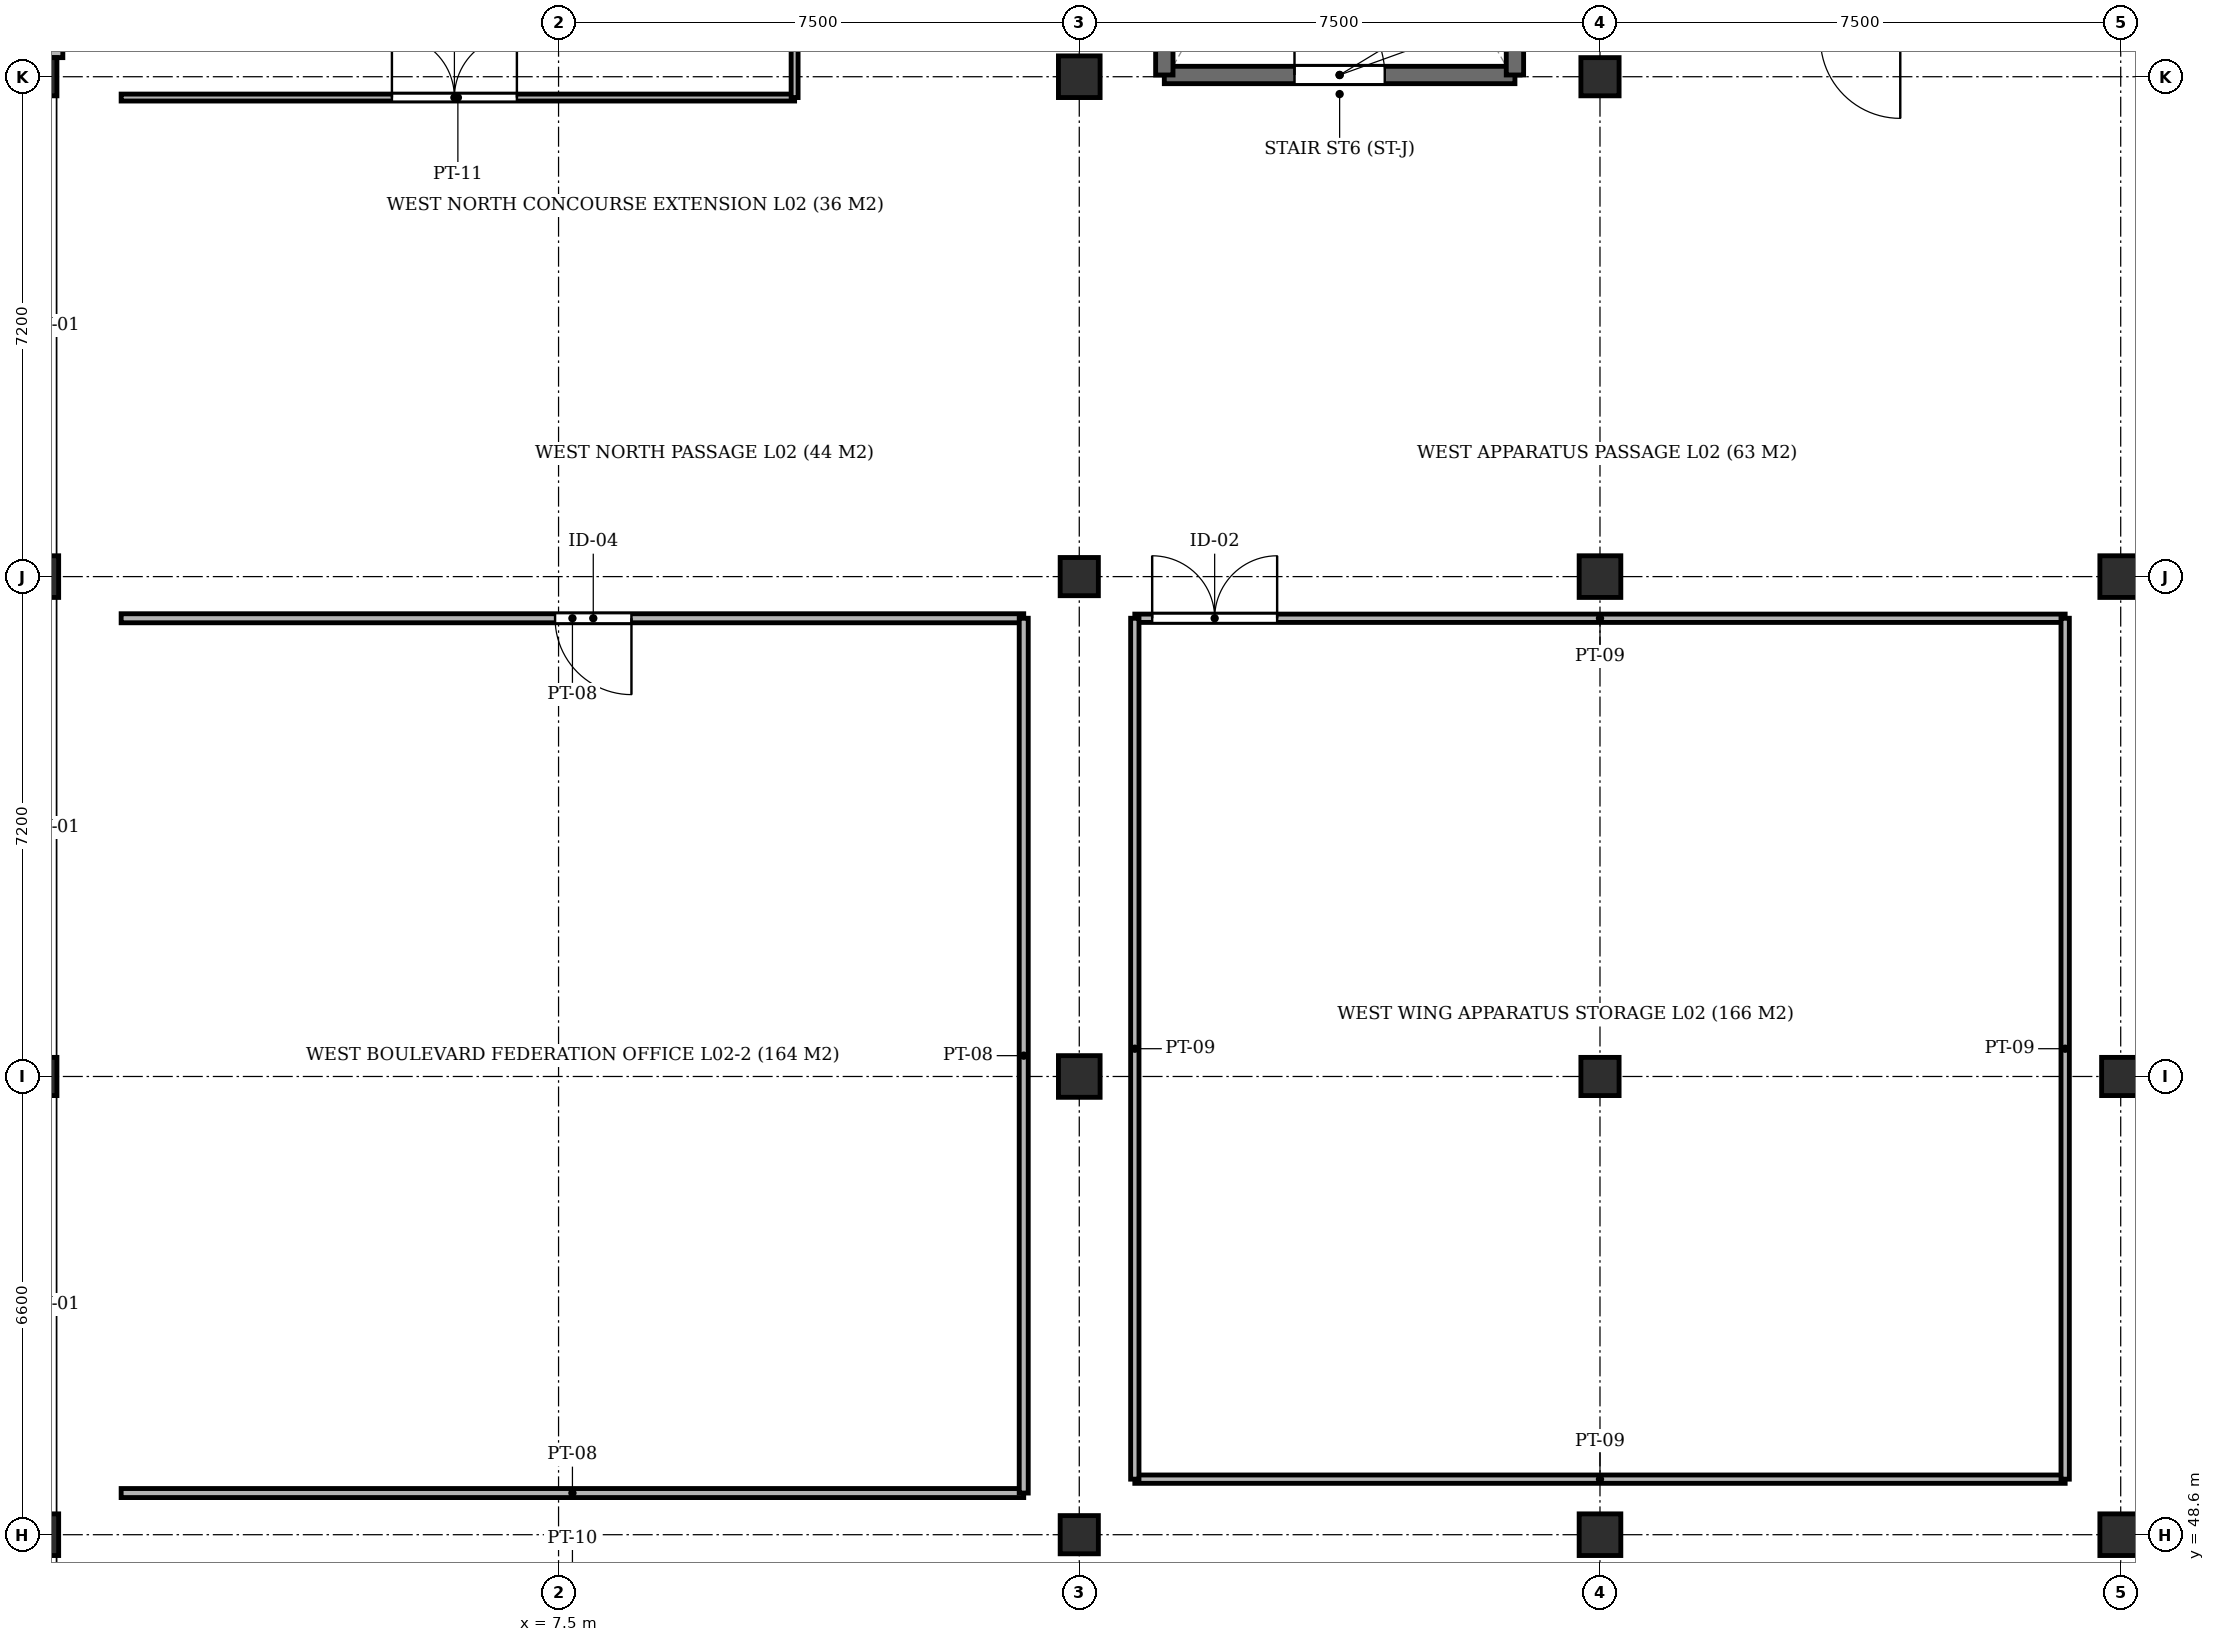
"""IFC4 building model, lengths in metres.
Left out: names, types, materials, properties, quantities, classifications, styles, units other than length and angle.
Written with IfcOpenShell. Run it as: python <this file> out.ifc"""

import sys

from ifc_helpers import new_model, si_unit, direction, frame, frame_2d, origin, origin_2d, place, context, subcontext, project, spatial, rectangle, extrude, element, fill, save


model = new_model("IFC4")
c1 = context("Model", 3, precision=1e-05, world=origin(), true_north=direction((0.0, 1.0)))
c2 = subcontext(c1, "Body", "Model", "MODEL_VIEW")
j1 = project(units=[si_unit("LENGTHUNIT", "METRE"), si_unit("PLANEANGLEUNIT", "RADIAN")], contexts=[c1])
p1 = place(None, origin())
s1 = spatial("IfcSite", under=j1, at=p1, CompositionType="ELEMENT")
p2 = place(p1, origin())
s2 = spatial("IfcBuilding", under=s1, at=p2, CompositionType="ELEMENT")
p3 = place(p2, frame((0.0, 0.0, 9.4)))
s3 = spatial("IfcBuildingStorey", under=s2, at=p3, CompositionType="ELEMENT", Elevation=9.4)
p4 = place(p3, frame((0.0, 48.6, -0.45), z_axis=(0.0, 0.0, 1.0), x_axis=(1.0, 0.0, 0.0)))
e1 = element("IfcColumn", 1, at=p4, inside=s3, PredefinedType="COLUMN", context=c2, shape_type="SweptSolid", body=[
    extrude(rectangle(XDim=0.6, YDim=0.6, at=origin_2d()), origin(), (0.0, 0.0, 1.0), 4.77),
])
p5 = place(p3, frame((0.0, 55.2, -0.45), z_axis=(0.0, 0.0, 1.0), x_axis=(1.0, 0.0, 0.0)))
e2 = element("IfcColumn", 2, at=p5, inside=s3, PredefinedType="COLUMN", context=c2, shape_type="SweptSolid", body=[
    extrude(rectangle(XDim=0.55, YDim=0.55, at=origin_2d()), origin(), (0.0, 0.0, 1.0), 4.77),
])
p6 = place(p3, frame((0.0, 62.4, -0.45), z_axis=(0.0, 0.0, 1.0), x_axis=(1.0, 0.0, 0.0)))
e3 = element("IfcColumn", 3, at=p6, inside=s3, PredefinedType="COLUMN", context=c2, shape_type="SweptSolid", body=[
    extrude(rectangle(XDim=0.6, YDim=0.6, at=origin_2d()), origin(), (0.0, 0.0, 1.0), 4.77),
])
for number, where, z_axis, x_axis in (
    (4, (0.0, 69.6, -0.45), (0.0, 0.0, 1.0), (1.0, 0.0, 0.0)),
    (5, (15.0, 48.6, -0.45), (0.0, 0.0, 1.0), (1.0, 0.0, 0.0)),
):
    element("IfcColumn", number, at=place(p3, frame(where, z_axis=z_axis, x_axis=x_axis)), inside=s3, PredefinedType="COLUMN", context=c2, shape_type="SweptSolid", body=[
        extrude(rectangle(XDim=0.55, YDim=0.55, at=origin_2d()), origin(), (0.0, 0.0, 1.0), 4.77),
    ])
p7 = place(p3, frame((15.0, 55.2, -0.45), z_axis=(0.0, 0.0, 1.0), x_axis=(1.0, 0.0, 0.0)))
e6 = element("IfcColumn", 6, at=p7, inside=s3, PredefinedType="COLUMN", context=c2, shape_type="SweptSolid", body=[
    extrude(rectangle(XDim=0.6, YDim=0.6, at=origin_2d()), origin(), (0.0, 0.0, 1.0), 4.77),
])
p8 = place(p3, frame((15.0, 62.4, -0.45), z_axis=(0.0, 0.0, 1.0), x_axis=(1.0, 0.0, 0.0)))
e7 = element("IfcColumn", 7, at=p8, inside=s3, PredefinedType="COLUMN", context=c2, shape_type="SweptSolid", body=[
    extrude(rectangle(XDim=0.55, YDim=0.55, at=origin_2d()), origin(), (0.0, 0.0, 1.0), 4.77),
])
for number, where, z_axis, x_axis in (
    (8, (15.0, 69.6, -0.45), (0.0, 0.0, 1.0), (1.0, 0.0, 0.0)),
    (9, (22.5, 48.6, -0.45), (0.0, 0.0, 1.0), (1.0, 0.0, 0.0)),
):
    element("IfcColumn", number, at=place(p3, frame(where, z_axis=z_axis, x_axis=x_axis)), inside=s3, PredefinedType="COLUMN", context=c2, shape_type="SweptSolid", body=[
        extrude(rectangle(XDim=0.6, YDim=0.6, at=origin_2d()), origin(), (0.0, 0.0, 1.0), 4.77),
    ])
p9 = place(p3, frame((22.5, 55.2, -0.45), z_axis=(0.0, 0.0, 1.0), x_axis=(1.0, 0.0, 0.0)))
e10 = element("IfcColumn", 10, at=p9, inside=s3, PredefinedType="COLUMN", context=c2, shape_type="SweptSolid", body=[
    extrude(rectangle(XDim=0.55, YDim=0.55, at=origin_2d()), origin(), (0.0, 0.0, 1.0), 4.77),
])
p10 = place(p3, frame((22.5, 62.4, -0.45), z_axis=(0.0, 0.0, 1.0), x_axis=(1.0, 0.0, 0.0)))
e11 = element("IfcColumn", 11, at=p10, inside=s3, PredefinedType="COLUMN", context=c2, shape_type="SweptSolid", body=[
    extrude(rectangle(XDim=0.6, YDim=0.6, at=origin_2d()), origin(), (0.0, 0.0, 1.0), 4.77),
])
p11 = place(p3, frame((22.5, 69.6, -0.45), z_axis=(0.0, 0.0, 1.0), x_axis=(1.0, 0.0, 0.0)))
e12 = element("IfcColumn", 12, at=p11, inside=s3, PredefinedType="COLUMN", context=c2, shape_type="SweptSolid", body=[
    extrude(rectangle(XDim=0.55, YDim=0.55, at=origin_2d()), origin(), (0.0, 0.0, 1.0), 4.77),
])
p12 = place(p3, frame((30.0, 48.6, -0.45), z_axis=(0.0, 0.0, 1.0), x_axis=(1.0, 0.0, 0.0)))
e13 = element("IfcColumn", 13, at=p12, inside=s3, PredefinedType="COLUMN", context=c2, shape_type="SweptSolid", body=[
    extrude(rectangle(XDim=0.6, YDim=0.6, at=origin_2d()), origin(), (0.0, 0.0, 1.0), 4.77),
])
p13 = place(p3, frame((30.0, 55.2, -0.45), z_axis=(0.0, 0.0, 1.0), x_axis=(1.0, 0.0, 0.0)))
e14 = element("IfcColumn", 14, at=p13, inside=s3, PredefinedType="COLUMN", context=c2, shape_type="SweptSolid", body=[
    extrude(rectangle(XDim=0.55, YDim=0.55, at=origin_2d()), origin(), (0.0, 0.0, 1.0), 4.77),
])
p14 = place(p3, frame((30.0, 62.4, -0.45), z_axis=(0.0, 0.0, 1.0), x_axis=(1.0, 0.0, 0.0)))
e15 = element("IfcColumn", 15, at=p14, inside=s3, PredefinedType="COLUMN", context=c2, shape_type="SweptSolid", body=[
    extrude(rectangle(XDim=0.6, YDim=0.6, at=origin_2d()), origin(), (0.0, 0.0, 1.0), 4.77),
])
p15 = place(p3, frame((0.18, 76.8, 0.0), z_axis=(0.0, 0.0, 1.0), x_axis=(0.0, -1.0, 0.0)))
e16 = element("IfcWall", 16, at=p15, inside=s3, PredefinedType="SOLIDWALL", context=c2, shape_type="SweptSolid", body=[
    extrude(rectangle(XDim=6.925, YDim=0.36, at=frame_2d((3.462, 0.0))), origin(), (0.0, 0.0, 1.0), 3.45),
])
p16 = place(p15, frame((3.917, 0.0, 0.92)))
e17 = element("IfcOpeningElement", 17, at=p16, cuts=e16, PredefinedType="OPENING", context=c2, shape_type="SweptSolid", body=[
    extrude(rectangle(XDim=2.0, YDim=2.1, at=frame_2d((1.0, 1.05))), frame((0.0, 0.192, 0.0), z_axis=(0.0, -1.0, 0.0), x_axis=(1.0, 0.0, 0.0)), (0.0, 0.0, 1.0), 0.384),
])
p17 = place(p15, frame((1.008, 0.0, 0.92)))
e18 = element("IfcOpeningElement", 18, at=p17, cuts=e16, PredefinedType="OPENING", context=c2, shape_type="SweptSolid", body=[
    extrude(rectangle(XDim=2.0, YDim=2.1, at=frame_2d((1.0, 1.05))), frame((0.0, 0.192, 0.0), z_axis=(0.0, -1.0, 0.0), x_axis=(1.0, 0.0, 0.0)), (0.0, 0.0, 1.0), 0.384),
])
p18 = place(p3, frame((16.225, 69.625, 0.0), z_axis=(0.0, 0.0, 1.0), x_axis=(1.0, 0.0, 0.0)))
e19 = element("IfcWall", 19, at=p18, inside=s3, PredefinedType="SHEAR", context=c2, shape_type="SweptSolid", body=[
    extrude(rectangle(XDim=5.05, YDim=0.25, at=frame_2d((2.525, 0.0))), origin(), (0.0, 0.0, 1.0), 4.32),
])
p19 = place(p18, frame((1.875, 0.0, 0.0)))
e20 = element("IfcOpeningElement", 20, at=p19, cuts=e19, PredefinedType="OPENING", context=c2, shape_type="SweptSolid", body=[
    extrude(rectangle(XDim=1.3, YDim=2.2, at=frame_2d((0.65, 1.1))), frame((0.0, 0.137, 0.0), z_axis=(0.0, -1.0, 0.0), x_axis=(1.0, 0.0, 0.0)), (0.0, 0.0, 1.0), 0.274),
])
for number, where, z_axis, x_axis in (
    (21, (16.225, 78.325, 0.0), (0.0, 0.0, 1.0), (0.0, -1.0, 0.0)),
    (22, (21.275, 69.625, 0.0), (0.0, 0.0, 1.0), (0.0, 1.0, 0.0)),
):
    element("IfcWall", number, at=place(p3, frame(where, z_axis=z_axis, x_axis=x_axis)), inside=s3, PredefinedType="SHEAR", context=c2, shape_type="SweptSolid", body=[
        extrude(rectangle(XDim=8.7, YDim=0.25, at=frame_2d((4.35, 0.0))), origin(), (0.0, 0.0, 1.0), 4.32),
    ])
p20 = place(p3, frame((1.2, 49.2, 0.0), z_axis=(0.0, 0.0, 1.0), x_axis=(1.0, 0.0, 0.0)))
e23 = element("IfcWall", 23, at=p20, inside=s3, PredefinedType="PARTITIONING", context=c2, shape_type="SweptSolid", body=[
    extrude(rectangle(XDim=13.0, YDim=0.13, at=frame_2d((6.5, 0.0))), origin(), (0.0, 0.0, 1.0), 3.88),
])
p21 = place(p3, frame((1.2, 61.8, 0.0), z_axis=(0.0, 0.0, 1.0), x_axis=(1.0, 0.0, 0.0)))
e24 = element("IfcWall", 24, at=p21, inside=s3, PredefinedType="PARTITIONING", context=c2, shape_type="SweptSolid", body=[
    extrude(rectangle(XDim=13.0, YDim=0.13, at=frame_2d((6.5, 0.0))), origin(), (0.0, 0.0, 1.0), 3.88),
])
p22 = place(p21, frame((6.25, 0.0, 0.0)))
e25 = element("IfcOpeningElement", 25, at=p22, cuts=e24, PredefinedType="OPENING", context=c2, shape_type="SweptSolid", body=[
    extrude(rectangle(XDim=1.1, YDim=2.15, at=frame_2d((0.55, 1.075))), frame((0.0, 0.077, 0.0), z_axis=(0.0, -1.0, 0.0), x_axis=(1.0, 0.0, 0.0)), (0.0, 0.0, 1.0), 0.154),
])
p23 = place(p3, frame((14.2, 49.2, 0.0), z_axis=(0.0, 0.0, 1.0), x_axis=(0.0, 1.0, 0.0)))
e26 = element("IfcWall", 26, at=p23, inside=s3, PredefinedType="PARTITIONING", context=c2, shape_type="SweptSolid", body=[
    extrude(rectangle(XDim=12.6, YDim=0.13, at=frame_2d((6.3, 0.0))), origin(), (0.0, 0.0, 1.0), 3.88),
])
p24 = place(p3, frame((1.2, 69.3, 0.0), z_axis=(0.0, 0.0, 1.0), x_axis=(1.0, 0.0, 0.0)))
e27 = element("IfcWall", 27, at=p24, inside=s3, PredefinedType="PARTITIONING", context=c2, shape_type="SweptSolid", body=[
    extrude(rectangle(XDim=9.7, YDim=0.1, at=frame_2d((4.85, 0.0))), origin(), (0.0, 0.0, 1.0), 3.15),
])
p25 = place(p24, frame((3.9, 0.0, 0.0)))
e28 = element("IfcOpeningElement", 28, at=p25, cuts=e27, PredefinedType="OPENING", context=c2, shape_type="SweptSolid", body=[
    extrude(rectangle(XDim=1.8, YDim=2.25, at=frame_2d((0.9, 1.125))), frame((0.0, 0.062, 0.0), z_axis=(0.0, -1.0, 0.0), x_axis=(1.0, 0.0, 0.0)), (0.0, 0.0, 1.0), 0.124),
])
p26 = place(p3, frame((10.9, 69.3, 0.0), z_axis=(0.0, 0.0, 1.0), x_axis=(0.0, 1.0, 0.0)))
e29 = element("IfcWall", 29, at=p26, inside=s3, PredefinedType="PARTITIONING", context=c2, shape_type="SweptSolid", body=[
    extrude(rectangle(XDim=11.1, YDim=0.1, at=frame_2d((5.55, 0.0))), origin(), (0.0, 0.0, 1.0), 3.88),
])
p27 = place(p3, frame((15.8, 49.4, 0.0), z_axis=(0.0, 0.0, 1.0), x_axis=(1.0, 0.0, 0.0)))
e30 = element("IfcWall", 30, at=p27, inside=s3, PredefinedType="PARTITIONING", context=c2, shape_type="SweptSolid", body=[
    extrude(rectangle(XDim=13.4, YDim=0.12, at=frame_2d((6.7, 0.0))), origin(), (0.0, 0.0, 1.0), 3.88),
])
p28 = place(p3, frame((15.8, 61.8, 0.0), z_axis=(0.0, 0.0, 1.0), x_axis=(1.0, 0.0, 0.0)))
e31 = element("IfcWall", 31, at=p28, inside=s3, PredefinedType="PARTITIONING", context=c2, shape_type="SweptSolid", body=[
    extrude(rectangle(XDim=13.4, YDim=0.12, at=frame_2d((6.7, 0.0))), origin(), (0.0, 0.0, 1.0), 3.88),
])
p29 = place(p28, frame((0.25, 0.0, 0.0)))
e32 = element("IfcOpeningElement", 32, at=p29, cuts=e31, PredefinedType="OPENING", context=c2, shape_type="SweptSolid", body=[
    extrude(rectangle(XDim=1.8, YDim=2.25, at=frame_2d((0.9, 1.125))), frame((0.0, 0.072, 0.0), z_axis=(0.0, -1.0, 0.0), x_axis=(1.0, 0.0, 0.0)), (0.0, 0.0, 1.0), 0.144),
])
for number, where, z_axis, x_axis in (
    (33, (15.8, 49.4, 0.0), (0.0, 0.0, 1.0), (0.0, 1.0, 0.0)),
    (34, (29.2, 49.4, 0.0), (0.0, 0.0, 1.0), (0.0, 1.0, 0.0)),
):
    element("IfcWall", number, at=place(p3, frame(where, z_axis=z_axis, x_axis=x_axis)), inside=s3, PredefinedType="PARTITIONING", context=c2, shape_type="SweptSolid", body=[
        extrude(rectangle(XDim=12.4, YDim=0.12, at=frame_2d((6.2, 0.0))), origin(), (0.0, 0.0, 1.0), 3.88),
    ])
p30 = place(p19, origin())
e35 = element("IfcDoor", 35, at=p30, inside=s3, OperationType="SINGLE_SWING_LEFT", PredefinedType="DOOR", context=c2, shape_type="SweptSolid", body=[
    extrude(rectangle(XDim=1.3, YDim=2.2, at=frame_2d((0.65, 1.1))), frame((0.0, 0.025, 0.0), z_axis=(0.0, -1.0, 0.0), x_axis=(1.0, 0.0, 0.0)), (0.0, 0.0, 1.0), 0.05),
])
fill(e20, e35)
p31 = place(p22, frame((1.1, 0.0, 0.0), z_axis=(0.0, 0.0, 1.0), x_axis=(-1.0, 0.0, 0.0)))
e36 = element("IfcDoor", 36, at=p31, inside=s3, OperationType="SINGLE_SWING_RIGHT", PredefinedType="DOOR", context=c2, shape_type="SweptSolid", body=[
    extrude(rectangle(XDim=1.1, YDim=2.15, at=frame_2d((0.55, 1.075))), frame((0.0, 0.025, 0.0), z_axis=(0.0, -1.0, 0.0), x_axis=(1.0, 0.0, 0.0)), (0.0, 0.0, 1.0), 0.05),
])
fill(e25, e36)
p32 = place(p25, origin())
e37 = element("IfcDoor", 37, at=p32, inside=s3, OperationType="DOUBLE_DOOR_SINGLE_SWING", PredefinedType="DOOR", context=c2, shape_type="SweptSolid", body=[
    extrude(rectangle(XDim=1.8, YDim=2.25, at=frame_2d((0.9, 1.125))), frame((0.0, 0.025, 0.0), z_axis=(0.0, -1.0, 0.0), x_axis=(1.0, 0.0, 0.0)), (0.0, 0.0, 1.0), 0.05),
])
fill(e28, e37)
p33 = place(p29, origin())
e38 = element("IfcDoor", 38, at=p33, inside=s3, OperationType="DOUBLE_DOOR_SINGLE_SWING", PredefinedType="DOOR", context=c2, shape_type="SweptSolid", body=[
    extrude(rectangle(XDim=1.8, YDim=2.25, at=frame_2d((0.9, 1.125))), frame((0.0, 0.025, 0.0), z_axis=(0.0, -1.0, 0.0), x_axis=(1.0, 0.0, 0.0)), (0.0, 0.0, 1.0), 0.05),
])
fill(e32, e38)
save(model, sys.argv[1])
